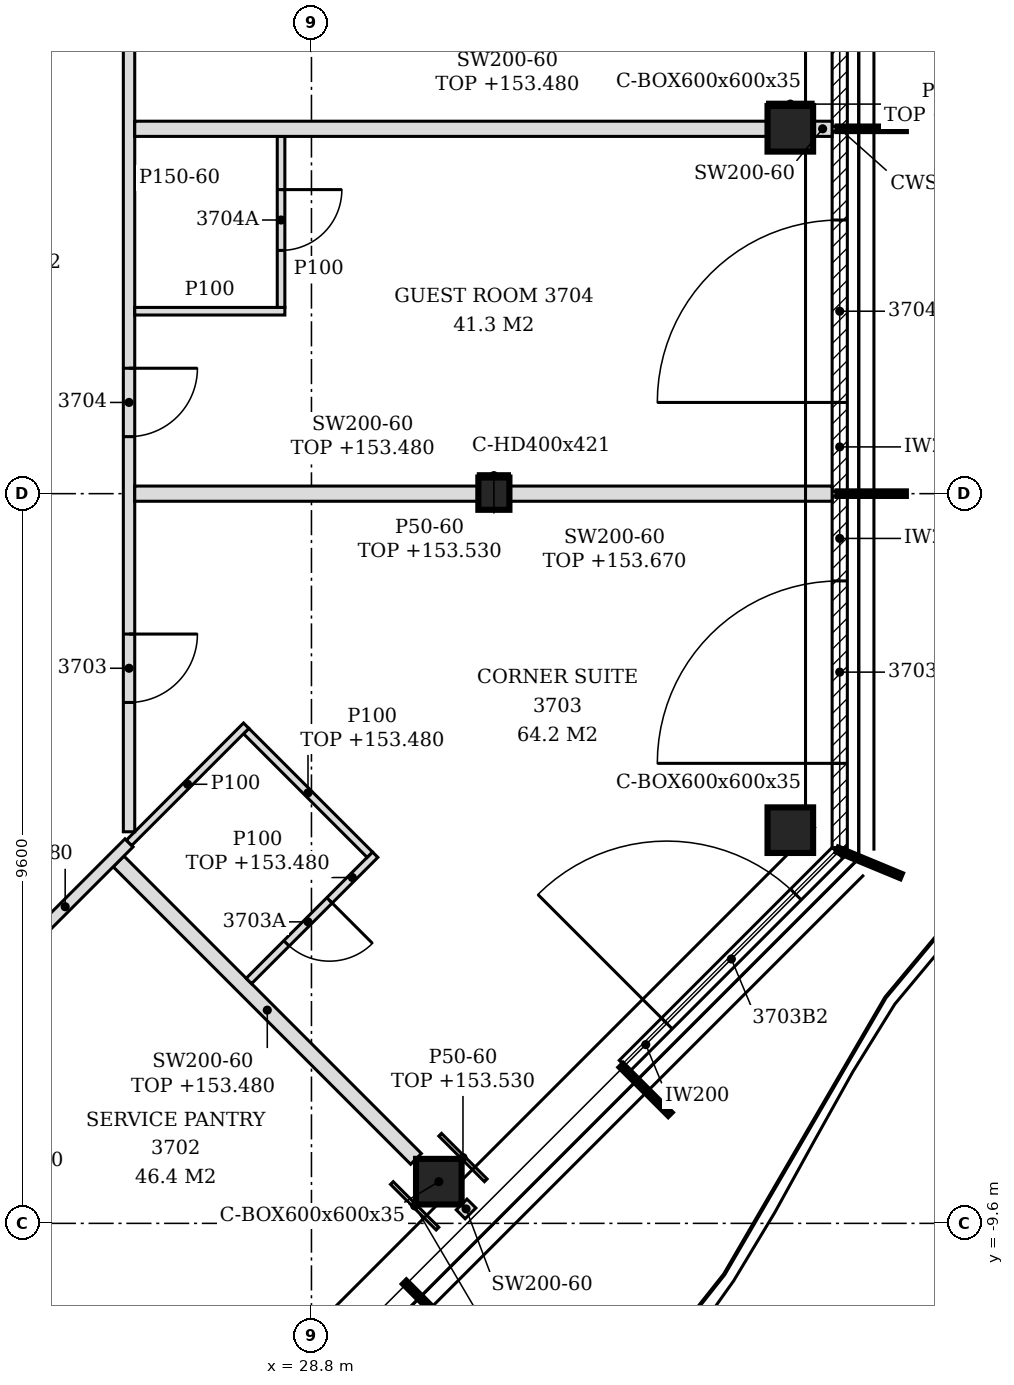
"""IFC4 building model, lengths in metres.
Left out: names, types, materials, properties, quantities, classifications, styles, units other than length and angle.
Written with IfcOpenShell. Run it as: python <this file> out.ifc"""

import sys

from ifc_helpers import new_model, si_unit, direction, frame, frame_2d, origin, origin_2d, place, context, subcontext, project, spatial, polyline, rectangle, hollow_rectangle, i_section, outline, extrude, element, fill, save


model = new_model("IFC4")
c1 = context("Model", 3, precision=1e-05, world=origin(), true_north=direction((0.0, 1.0)))
c2 = subcontext(c1, "Body", "Model", "MODEL_VIEW")
j1 = project(units=[si_unit("LENGTHUNIT", "METRE"), si_unit("PLANEANGLEUNIT", "RADIAN")], contexts=[c1])
p1 = place(None, origin())
s1 = spatial("IfcSite", under=j1, at=p1, CompositionType="ELEMENT")
p2 = place(p1, origin())
s2 = spatial("IfcBuilding", under=s1, at=p2, CompositionType="ELEMENT")
p3 = place(p2, frame((0.0, 0.0, 150.6)))
s3 = spatial("IfcBuildingStorey", under=s2, at=p3, CompositionType="ELEMENT", Elevation=150.6)
for number, where, z_axis, x_axis in (
    (1, (30.476, -9.052, -0.15), (0.0, 0.0, 1.0), (1.0, 0.0, 0.0)),
    (2, (35.1, -4.427, -0.15), (0.0, 0.0, 1.0), (1.0, 0.0, 0.0)),
    (3, (35.1, 4.8, -0.15), (0.0, 0.0, 1.0), (1.0, 0.0, 0.0)),
):
    element("IfcColumn", number, at=place(p3, frame(where, z_axis=z_axis, x_axis=x_axis)), inside=s3, PredefinedType="COLUMN", context=c2, shape_type="SweptSolid", body=[
        extrude(hollow_rectangle(XDim=0.6, YDim=0.6, WallThickness=0.035, at=origin_2d()), origin(), (0.0, 0.0, 1.0), 3.6),
    ])
p4 = place(p3, frame((31.2, 0.0, -0.15), z_axis=(0.0, 0.0, 1.0), x_axis=(1.0, 0.0, 0.0)))
e4 = element("IfcColumn", 4, at=p4, inside=s3, PredefinedType="COLUMN", context=c2, shape_type="SweptSolid", body=[
    extrude(i_section(OverallWidth=0.409, OverallDepth=0.425, WebThickness=0.033, FlangeThickness=0.052, FilletRadius=0.015, at=origin_2d()), origin(), (0.0, 0.0, 1.0), 3.6),
])
p5 = place(p3, frame((32.92, -7.526, 0.0), z_axis=(0.0, 0.0, 1.0), x_axis=(0.707106781187, 0.707106781187, 0.0)))
e5 = element("IfcWall", 5, at=p5, inside=s3, PredefinedType="NOTDEFINED", context=c2, shape_type="SweptSolid", body=[
    extrude(rectangle(XDim=3.962, YDim=0.2, at=frame_2d((1.981, 0.0))), origin(), (0.0, 0.0, 1.0), 3.45),
])
p6 = place(p5, frame((0.786, 0.0, 0.0)))
e6 = element("IfcOpeningElement", 6, at=p6, cuts=e5, PredefinedType="OPENING", context=c2, shape_type="SweptSolid", body=[
    extrude(rectangle(XDim=2.4, YDim=2.4, at=frame_2d((1.2, 1.2))), frame((0.0, 0.11, 0.0), z_axis=(0.0, -1.0, 0.0), x_axis=(1.0, 0.0, 0.0)), (0.0, 0.0, 1.0), 0.22),
])
p7 = place(p3, frame((35.75, -4.656, 0.0), z_axis=(0.0, 0.0, 1.0), x_axis=(0.0, 1.0, 0.0)))
e7 = element("IfcWall", 7, at=p7, inside=s3, PredefinedType="NOTDEFINED", context=c2, shape_type="SweptSolid", body=[
    extrude(rectangle(XDim=4.626, YDim=0.2, at=frame_2d((2.313, 0.0))), origin(), (0.0, 0.0, 1.0), 3.45),
])
p8 = place(p7, frame((1.108, 0.0, 0.0)))
e8 = element("IfcOpeningElement", 8, at=p8, cuts=e7, PredefinedType="OPENING", context=c2, shape_type="SweptSolid", body=[
    extrude(rectangle(XDim=2.4, YDim=2.4, at=frame_2d((1.2, 1.2))), frame((0.0, 0.11, 0.0), z_axis=(0.0, -1.0, 0.0), x_axis=(1.0, 0.0, 0.0)), (0.0, 0.0, 1.0), 0.22),
])
p9 = place(p3, frame((35.75, 0.03, 0.0), z_axis=(0.0, 0.0, 1.0), x_axis=(0.0, 1.0, 0.0)))
e9 = element("IfcWall", 9, at=p9, inside=s3, PredefinedType="NOTDEFINED", context=c2, shape_type="SweptSolid", body=[
    extrude(rectangle(XDim=4.74, YDim=0.2, at=frame_2d((2.37, 0.0))), origin(), (0.0, 0.0, 1.0), 3.45),
])
p10 = place(p9, frame((1.17, 0.0, 0.0)))
e10 = element("IfcOpeningElement", 10, at=p10, cuts=e9, PredefinedType="OPENING", context=c2, shape_type="SweptSolid", body=[
    extrude(rectangle(XDim=2.4, YDim=2.4, at=frame_2d((1.2, 1.2))), frame((0.0, 0.11, 0.0), z_axis=(0.0, -1.0, 0.0), x_axis=(1.0, 0.0, 0.0)), (0.0, 0.0, 1.0), 0.22),
])
p11 = place(p3, frame((35.75, 4.83, 0.0), z_axis=(0.0, 0.0, 1.0), x_axis=(0.0, 1.0, 0.0)))
e11 = element("IfcWall", 11, at=p11, inside=s3, PredefinedType="NOTDEFINED", context=c2, shape_type="SweptSolid", body=[
    extrude(rectangle(XDim=4.74, YDim=0.2, at=frame_2d((2.37, 0.0))), origin(), (0.0, 0.0, 1.0), 3.45),
])
p12 = place(p11, frame((1.17, 0.0, 0.0)))
e12 = element("IfcOpeningElement", 12, at=p12, cuts=e11, PredefinedType="OPENING", context=c2, shape_type="SweptSolid", body=[
    extrude(rectangle(XDim=2.4, YDim=2.4, at=frame_2d((1.2, 1.2))), frame((0.0, 0.11, 0.0), z_axis=(0.0, -1.0, 0.0), x_axis=(1.0, 0.0, 0.0)), (0.0, 0.0, 1.0), 0.22),
])
p13 = place(p3, frame((25.552, -13.375, 0.0), z_axis=(0.0, 0.0, 1.0), x_axis=(-0.707106781187, 0.707106781187, 0.0)))
e13 = element("IfcWall", 13, at=p13, inside=s3, PredefinedType="PARTITIONING", context=c2, shape_type="SweptSolid", body=[
    extrude(rectangle(XDim=6.83, YDim=0.2, at=frame_2d((3.415, 0.0))), origin(), (0.0, 0.0, 1.0), 2.93),
])
p14 = place(p3, frame((30.893, -9.469, 0.0), z_axis=(0.0, 0.0, 1.0), x_axis=(-0.707106781187, 0.707106781187, 0.0)))
e14 = element("IfcWall", 14, at=p14, inside=s3, PredefinedType="PARTITIONING", context=c2, shape_type="SweptSolid", body=[
    extrude(rectangle(XDim=0.166, YDim=0.2, at=frame_2d((0.083, 0.0))), origin(), (0.0, 0.0, 1.0), 3.45),
])
p15 = place(p3, frame((30.176, -8.752, 0.0), z_axis=(0.0, 0.0, 1.0), x_axis=(-0.707084725798, 0.707128835887, 0.0)))
e15 = element("IfcWall", 15, at=p15, inside=s3, PredefinedType="PARTITIONING", context=c2, shape_type="SweptSolid", body=[
    extrude(rectangle(XDim=5.535, YDim=0.2, at=frame_2d((2.768, 0.0))), origin(), (0.0, 0.0, 1.0), 2.88),
])
p16 = place(p3, frame((22.722, -8.272, 0.0), z_axis=(0.0, 0.0, 1.0), x_axis=(0.707106781187, 0.707106781187, 0.0)))
e16 = element("IfcWall", 16, at=p16, inside=s3, PredefinedType="PARTITIONING", context=c2, shape_type="SweptSolid", body=[
    extrude(rectangle(XDim=5.201, YDim=0.15, at=frame_2d((2.601, 0.0))), origin(), (0.0, 0.0, 1.0), 2.88),
])
p17 = place(p16, frame((1.925, 0.0, 0.0)))
e17 = element("IfcOpeningElement", 17, at=p17, cuts=e16, PredefinedType="OPENING", context=c2, shape_type="SweptSolid", body=[
    extrude(rectangle(XDim=0.9, YDim=2.1, at=frame_2d((0.45, 1.05))), frame((0.0, 0.085, 0.0), z_axis=(0.0, -1.0, 0.0), x_axis=(1.0, 0.0, 0.0)), (0.0, 0.0, 1.0), 0.17),
])
p18 = place(p3, frame((27.977, -6.411, 0.0), z_axis=(0.0, 0.0, 1.0), x_axis=(0.707054828152, 0.707158730404, 0.0)))
e18 = element("IfcWall", 18, at=p18, inside=s3, PredefinedType="PARTITIONING", context=c2, shape_type="SweptSolid", body=[
    extrude(rectangle(XDim=2.35, YDim=0.1, at=frame_2d((1.175, 0.0))), origin(), (0.0, 0.0, 1.0), 2.88),
])
p19 = place(p18, frame((0.7, 0.0, 0.0)))
e19 = element("IfcOpeningElement", 19, at=p19, cuts=e18, PredefinedType="OPENING", context=c2, shape_type="SweptSolid", body=[
    extrude(rectangle(XDim=0.8, YDim=2.1, at=frame_2d((0.4, 1.05))), frame((0.0, 0.06, 0.0), z_axis=(0.0, -1.0, 0.0), x_axis=(1.0, 0.0, 0.0)), (0.0, 0.0, 1.0), 0.12),
])
p20 = place(p3, frame((29.568, -4.75, 0.0), z_axis=(0.0, 0.0, 1.0), x_axis=(-0.707106781187, 0.707106781187, 0.0)))
e20 = element("IfcWall", 20, at=p20, inside=s3, PredefinedType="PARTITIONING", context=c2, shape_type="SweptSolid", body=[
    extrude(rectangle(XDim=2.3, YDim=0.1, at=frame_2d((1.15, 0.0))), origin(), (0.0, 0.0, 1.0), 2.88),
])
p21 = place(p3, frame((26.4, -4.594, 0.0), z_axis=(0.0, 0.0, 1.0), x_axis=(0.707106781187, 0.707106781187, 0.0)))
e21 = element("IfcWall", 21, at=p21, inside=s3, PredefinedType="PARTITIONING", context=c2, shape_type="SweptSolid", body=[
    extrude(rectangle(XDim=2.18, YDim=0.1, at=frame_2d((1.09, 0.0))), origin(), (0.0, 0.0, 1.0), 3.45),
])
p22 = place(p3, frame((26.4, -4.448, 0.0), z_axis=(0.0, 0.0, 1.0), x_axis=(0.0, 1.0, 0.0)))
e22 = element("IfcWall", 22, at=p22, inside=s3, PredefinedType="PARTITIONING", context=c2, shape_type="SweptSolid", body=[
    extrude(outline(polyline([(0.0, 0.0), (13.948, 0.0), (13.948, 2.88), (13.943, 2.88), (13.941, 3.45), (9.353, 3.45), (9.351, 2.88), (9.143, 2.88), (9.141, 3.45), (4.553, 3.45), (4.551, 2.88), (4.343, 2.88), (4.341, 3.45), (0.0, 3.45), (0.0, 0.0)])), frame((0.0, 0.075, 0.0), z_axis=(0.0, -1.0, 0.0), x_axis=(1.0, 0.0, 0.0)), (0.0, 0.0, 1.0), 0.15),
])
p23 = place(p22, frame((1.701, 0.0, 0.0)))
e23 = element("IfcOpeningElement", 23, at=p23, cuts=e22, PredefinedType="OPENING", context=c2, shape_type="SweptSolid", body=[
    extrude(rectangle(XDim=0.9, YDim=2.1, at=frame_2d((0.45, 1.05))), frame((0.0, 0.085, 0.0), z_axis=(0.0, -1.0, 0.0), x_axis=(1.0, 0.0, 0.0)), (0.0, 0.0, 1.0), 0.17),
])
p24 = place(p22, frame((5.198, 0.0, 0.0)))
e24 = element("IfcOpeningElement", 24, at=p24, cuts=e22, PredefinedType="OPENING", context=c2, shape_type="SweptSolid", body=[
    extrude(rectangle(XDim=0.9, YDim=2.1, at=frame_2d((0.45, 1.05))), frame((0.0, 0.085, 0.0), z_axis=(0.0, -1.0, 0.0), x_axis=(1.0, 0.0, 0.0)), (0.0, 0.0, 1.0), 0.17),
])
p25 = place(p22, frame((11.095, 0.0, 0.0)))
e25 = element("IfcOpeningElement", 25, at=p25, cuts=e22, PredefinedType="OPENING", context=c2, shape_type="SweptSolid", body=[
    extrude(rectangle(XDim=0.9, YDim=2.1, at=frame_2d((0.45, 1.05))), frame((0.0, 0.085, 0.0), z_axis=(0.0, -1.0, 0.0), x_axis=(1.0, 0.0, 0.0)), (0.0, 0.0, 1.0), 0.17),
])
p26 = place(p3, frame((26.475, 0.0, 0.0), z_axis=(0.0, 0.0, 1.0), x_axis=(1.0, 0.0, 0.0)))
e26 = element("IfcWall", 26, at=p26, inside=s3, PredefinedType="PARTITIONING", context=c2, shape_type="SweptSolid", body=[
    extrude(rectangle(XDim=4.521, YDim=0.2, at=frame_2d((2.26, 0.0))), origin(), (0.0, 0.0, 1.0), 2.88),
])
p27 = place(p3, frame((31.405, 0.0, 0.0), z_axis=(0.0, 0.0, 1.0), x_axis=(1.0, 0.0, 0.0)))
e27 = element("IfcWall", 27, at=p27, inside=s3, PredefinedType="PARTITIONING", context=c2, shape_type="SweptSolid", body=[
    extrude(outline(polyline([(0.0, 0.0), (4.245, 0.0), (4.246, 3.07), (3.845, 3.07), (3.844, 2.93), (3.545, 2.93), (3.543, 3.07), (0.0, 3.07), (0.0, 0.0)])), frame((0.0, 0.1, 0.0), z_axis=(0.0, -1.0, 0.0), x_axis=(1.0, 0.0, 0.0)), (0.0, 0.0, 1.0), 0.2),
])
p28 = place(p3, frame((26.475, 2.4, 0.0), z_axis=(0.0, 0.0, 1.0), x_axis=(1.0, 0.0, 0.0)))
e28 = element("IfcWall", 28, at=p28, inside=s3, PredefinedType="PARTITIONING", context=c2, shape_type="SweptSolid", body=[
    extrude(rectangle(XDim=1.975, YDim=0.1, at=frame_2d((0.987, 0.0))), origin(), (0.0, 0.0, 1.0), 3.45),
])
p29 = place(p3, frame((28.4, 2.45, 0.0), z_axis=(0.0, 0.0, 1.0), x_axis=(0.0, 1.0, 0.0)))
e29 = element("IfcWall", 29, at=p29, inside=s3, PredefinedType="PARTITIONING", context=c2, shape_type="SweptSolid", body=[
    extrude(outline(polyline([(0.0, 0.0), (2.25, 0.0), (2.25, 2.88), (2.245, 2.88), (2.243, 3.45), (0.0, 3.45), (0.0, 0.0)])), frame((0.0, 0.05, 0.0), z_axis=(0.0, -1.0, 0.0), x_axis=(1.0, 0.0, 0.0)), (0.0, 0.0, 1.0), 0.1),
])
p30 = place(p29, frame((0.75, 0.0, 0.0)))
e30 = element("IfcOpeningElement", 30, at=p30, cuts=e29, PredefinedType="OPENING", context=c2, shape_type="SweptSolid", body=[
    extrude(rectangle(XDim=0.8, YDim=2.1, at=frame_2d((0.4, 1.05))), frame((0.0, 0.06, 0.0), z_axis=(0.0, -1.0, 0.0), x_axis=(1.0, 0.0, 0.0)), (0.0, 0.0, 1.0), 0.12),
])
p31 = place(p3, frame((26.475, 4.8, 0.0), z_axis=(0.0, 0.0, 1.0), x_axis=(1.0, 0.0, 0.0)))
e31 = element("IfcWall", 31, at=p31, inside=s3, PredefinedType="PARTITIONING", context=c2, shape_type="SweptSolid", body=[
    extrude(rectangle(XDim=8.325, YDim=0.2, at=frame_2d((4.163, 0.0))), origin(), (0.0, 0.0, 1.0), 2.88),
])
p32 = place(p3, frame((35.4, 4.8, 0.0), z_axis=(0.0, 0.0, 1.0), x_axis=(1.0, 0.0, 0.0)))
e32 = element("IfcWall", 32, at=p32, inside=s3, PredefinedType="PARTITIONING", context=c2, shape_type="SweptSolid", body=[
    extrude(rectangle(XDim=0.25, YDim=0.2, at=frame_2d((0.125, 0.0))), origin(), (0.0, 0.0, 1.0), 3.45),
])
p33 = place(p3, frame((30.458, -9.669, 0.0), z_axis=(0.0, 0.0, 1.0), x_axis=(-0.707106781187, 0.707106781187, 0.0)))
e33 = element("IfcWall", 33, at=p33, inside=s3, PredefinedType="PARTITIONING", context=c2, shape_type="SweptSolid", body=[
    extrude(rectangle(XDim=0.849, YDim=0.05, at=frame_2d((0.424, 0.0))), origin(), (0.0, 0.0, 1.0), 2.63),
])
p34 = place(p3, frame((31.094, -9.034, 0.0), z_axis=(0.0, 0.0, 1.0), x_axis=(-0.707250633645, 0.706962899457, 0.0)))
e34 = element("IfcWall", 34, at=p34, inside=s3, PredefinedType="PARTITIONING", context=c2, shape_type="SweptSolid", body=[
    extrude(rectangle(XDim=0.848, YDim=0.05, at=frame_2d((0.424, 0.0))), origin(), (0.0, 0.0, 1.0), 2.93),
])
p35 = place(p3, frame((30.996, 0.238, 0.0), z_axis=(0.0, 0.0, 1.0), x_axis=(1.0, 0.0, 0.0)))
e35 = element("IfcWall", 35, at=p35, inside=s3, PredefinedType="PARTITIONING", context=c2, shape_type="SweptSolid", body=[
    extrude(rectangle(XDim=0.409, YDim=0.05, at=frame_2d((0.205, 0.0))), origin(), (0.0, 0.0, 1.0), 2.93),
])
p36 = place(p3, frame((34.8, 5.125, 0.0), z_axis=(0.0, 0.0, 1.0), x_axis=(1.0, 0.0, 0.0)))
e36 = element("IfcWall", 36, at=p36, inside=s3, PredefinedType="PARTITIONING", context=c2, shape_type="SweptSolid", body=[
    extrude(rectangle(XDim=0.6, YDim=0.05, at=frame_2d((0.3, 0.0))), origin(), (0.0, 0.0, 1.0), 2.93),
])
p37 = place(p6, origin())
e37 = element("IfcDoor", 37, at=p37, inside=s3, OperationType="SINGLE_SWING_LEFT", PredefinedType="DOOR", context=c2, shape_type="SweptSolid", body=[
    extrude(rectangle(XDim=2.4, YDim=2.4, at=frame_2d((1.2, 1.2))), frame((0.0, 0.025, 0.0), z_axis=(0.0, -1.0, 0.0), x_axis=(1.0, 0.0, 0.0)), (0.0, 0.0, 1.0), 0.05),
])
fill(e6, e37)
p38 = place(p8, origin())
e38 = element("IfcDoor", 38, at=p38, inside=s3, OperationType="SINGLE_SWING_LEFT", PredefinedType="DOOR", context=c2, shape_type="SweptSolid", body=[
    extrude(rectangle(XDim=2.4, YDim=2.4, at=frame_2d((1.2, 1.2))), frame((0.0, 0.025, 0.0), z_axis=(0.0, -1.0, 0.0), x_axis=(1.0, 0.0, 0.0)), (0.0, 0.0, 1.0), 0.05),
])
fill(e8, e38)
p39 = place(p10, origin())
e39 = element("IfcDoor", 39, at=p39, inside=s3, OperationType="SINGLE_SWING_LEFT", PredefinedType="DOOR", context=c2, shape_type="SweptSolid", body=[
    extrude(rectangle(XDim=2.4, YDim=2.4, at=frame_2d((1.2, 1.2))), frame((0.0, 0.025, 0.0), z_axis=(0.0, -1.0, 0.0), x_axis=(1.0, 0.0, 0.0)), (0.0, 0.0, 1.0), 0.05),
])
fill(e10, e39)
p40 = place(p23, frame((0.9, 0.0, 0.0), z_axis=(0.0, 0.0, 1.0), x_axis=(-1.0, 0.0, 0.0)))
e40 = element("IfcDoor", 40, at=p40, inside=s3, OperationType="SINGLE_SWING_LEFT", PredefinedType="DOOR", context=c2, shape_type="SweptSolid", body=[
    extrude(rectangle(XDim=0.9, YDim=2.1, at=frame_2d((0.45, 1.05))), frame((0.0, 0.025, 0.0), z_axis=(0.0, -1.0, 0.0), x_axis=(1.0, 0.0, 0.0)), (0.0, 0.0, 1.0), 0.05),
])
fill(e23, e40)
p41 = place(p19, frame((0.8, 0.0, 0.0), z_axis=(0.0, 0.0, 1.0), x_axis=(-1.0, 0.0, 0.0)))
e41 = element("IfcDoor", 41, at=p41, inside=s3, OperationType="SINGLE_SWING_LEFT", PredefinedType="DOOR", context=c2, shape_type="SweptSolid", body=[
    extrude(rectangle(XDim=0.8, YDim=2.1, at=frame_2d((0.4, 1.05))), frame((0.0, 0.025, 0.0), z_axis=(0.0, -1.0, 0.0), x_axis=(1.0, 0.0, 0.0)), (0.0, 0.0, 1.0), 0.05),
])
fill(e19, e41)
p42 = place(p24, frame((0.9, 0.0, 0.0), z_axis=(0.0, 0.0, 1.0), x_axis=(-1.0, 0.0, 0.0)))
e42 = element("IfcDoor", 42, at=p42, inside=s3, OperationType="SINGLE_SWING_LEFT", PredefinedType="DOOR", context=c2, shape_type="SweptSolid", body=[
    extrude(rectangle(XDim=0.9, YDim=2.1, at=frame_2d((0.45, 1.05))), frame((0.0, 0.025, 0.0), z_axis=(0.0, -1.0, 0.0), x_axis=(1.0, 0.0, 0.0)), (0.0, 0.0, 1.0), 0.05),
])
fill(e24, e42)
p43 = place(p30, frame((0.8, 0.0, 0.0), z_axis=(0.0, 0.0, 1.0), x_axis=(-1.0, 0.0, 0.0)))
e43 = element("IfcDoor", 43, at=p43, inside=s3, OperationType="SINGLE_SWING_LEFT", PredefinedType="DOOR", context=c2, shape_type="SweptSolid", body=[
    extrude(rectangle(XDim=0.8, YDim=2.1, at=frame_2d((0.4, 1.05))), frame((0.0, 0.025, 0.0), z_axis=(0.0, -1.0, 0.0), x_axis=(1.0, 0.0, 0.0)), (0.0, 0.0, 1.0), 0.05),
])
fill(e30, e43)
save(model, sys.argv[1])
